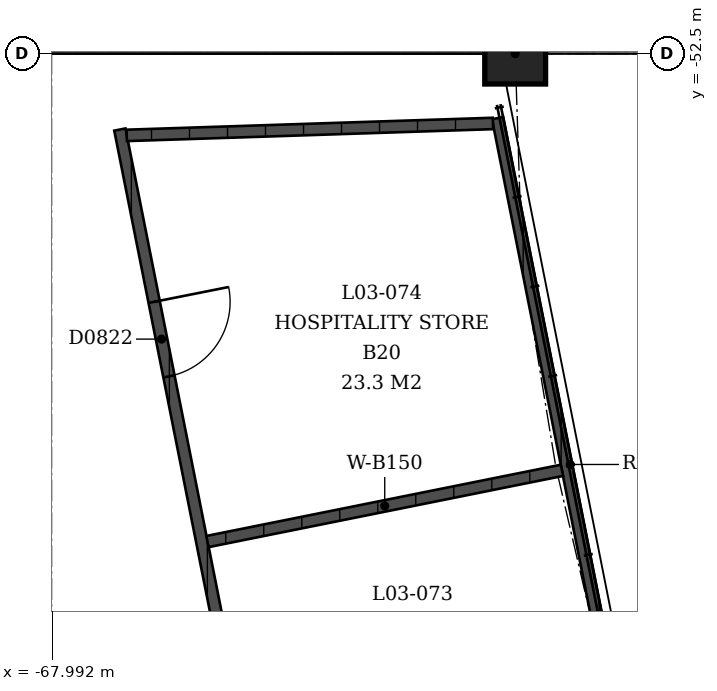
"""IFC4 building model, lengths in metres.
Left out: names, types, materials, properties, quantities, classifications, styles, units other than length and angle.
Written with IfcOpenShell. Run it as: python <this file> out.ifc"""

import sys

from ifc_helpers import new_model, si_unit, direction, frame, frame_2d, origin, origin_2d, place, context, subcontext, project, spatial, rectangle, extrude, element, fill, save


model = new_model("IFC4")
c1 = context("Model", 3, precision=1e-05, world=origin(), true_north=direction((0.0, 1.0)))
c2 = subcontext(c1, "Body", "Model", "MODEL_VIEW")
j1 = project(units=[si_unit("LENGTHUNIT", "METRE"), si_unit("PLANEANGLEUNIT", "RADIAN")], contexts=[c1])
p1 = place(None, origin())
s1 = spatial("IfcSite", under=j1, at=p1, CompositionType="ELEMENT")
p2 = place(p1, origin())
s2 = spatial("IfcBuilding", under=s1, at=p2, CompositionType="ELEMENT")
p3 = place(p2, frame((0.0, 0.0, 13.5)))
s3 = spatial("IfcBuildingStorey", under=s2, at=p3, CompositionType="ELEMENT", Elevation=13.5)
p4 = place(p3, frame((-61.9, -52.5, 0.0), z_axis=(0.0, 0.0, 1.0), x_axis=(0.0, -1.0, 0.0)))
e1 = element("IfcColumn", 1, at=p4, inside=s3, PredefinedType="COLUMN", context=c2, shape_type="SweptSolid", body=[
    extrude(rectangle(XDim=0.8, YDim=0.8, at=origin_2d()), origin(), (0.0, 0.0, 1.0), 2.033),
])
p5 = place(p3, frame((-60.235, -62.88, 0.0), z_axis=(0.0, 0.0, 1.0), x_axis=(-0.19508210738, 0.98078691436, 0.0)))
e2 = element("IfcWall", 2, at=p5, inside=s3, PredefinedType="SOLIDWALL", context=c2, shape_type="SweptSolid", body=[
    extrude(rectangle(XDim=9.718, YDim=0.15, at=frame_2d((4.859, 0.0))), origin(), (0.0, 0.0, 1.0), 3.0),
])
p6 = place(p3, frame((-64.939, -64.369, 0.0), z_axis=(0.0, 0.0, 1.0), x_axis=(-0.195090821685, 0.980785181013, 0.0)))
e3 = element("IfcWall", 3, at=p6, inside=s3, PredefinedType="SOLIDWALL", context=c2, shape_type="SweptSolid", body=[
    extrude(rectangle(XDim=11.083, YDim=0.15, at=frame_2d((5.541, 0.0))), origin(), (0.0, 0.0, 1.0), 3.0),
])
p7 = place(p6, frame((2.311, 0.0, 0.0)))
e4 = element("IfcOpeningElement", 4, at=p7, cuts=e3, PredefinedType="OPENING", context=c2, shape_type="SweptSolid", body=[
    extrude(rectangle(XDim=1.0, YDim=2.1, at=frame_2d((0.5, 1.05))), frame((0.0, 0.075, 0.0), z_axis=(0.0, -1.0, 0.0), x_axis=(1.0, 0.0, 0.0)), (0.0, 0.0, 1.0), 0.15),
])
p8 = place(p6, frame((7.771, 0.0, 0.0)))
e5 = element("IfcOpeningElement", 5, at=p8, cuts=e3, PredefinedType="OPENING", context=c2, shape_type="SweptSolid", body=[
    extrude(rectangle(XDim=1.0, YDim=2.1, at=frame_2d((0.5, 1.05))), frame((0.0, 0.075, 0.0), z_axis=(0.0, -1.0, 0.0), x_axis=(1.0, 0.0, 0.0)), (0.0, 0.0, 1.0), 0.15),
])
p9 = place(p3, frame((-61.284, -57.982, 0.0), z_axis=(0.0, 0.0, 1.0), x_axis=(-0.980408567663, -0.196974720342, 0.0)))
e6 = element("IfcWall", 6, at=p9, inside=s3, PredefinedType="SOLIDWALL", context=c2, shape_type="SweptSolid", body=[
    extrude(rectangle(XDim=4.757, YDim=0.15, at=frame_2d((2.378, 0.0))), origin(), (0.0, 0.0, 1.0), 3.0),
])
p10 = place(p3, frame((-62.192, -53.419, 0.0), z_axis=(0.0, 0.0, 1.0), x_axis=(-0.999469799468, -0.032559483284, 0.0)))
e7 = element("IfcWall", 7, at=p10, inside=s3, PredefinedType="SOLIDWALL", context=c2, shape_type="SweptSolid", body=[
    extrude(rectangle(XDim=4.821, YDim=0.15, at=frame_2d((2.411, 0.0))), origin(), (0.0, 0.0, 1.0), 3.0),
])
p11 = place(p8, origin())
e8 = element("IfcDoor", 8, at=p11, inside=s3, OperationType="SINGLE_SWING_RIGHT", PredefinedType="DOOR", context=c2, shape_type="SweptSolid", body=[
    extrude(rectangle(XDim=1.0, YDim=2.1, at=frame_2d((0.5, 1.05))), frame((0.0, 0.025, 0.0), z_axis=(0.0, -1.0, 0.0), x_axis=(1.0, 0.0, 0.0)), (0.0, 0.0, 1.0), 0.05),
])
fill(e5, e8)
save(model, sys.argv[1])
